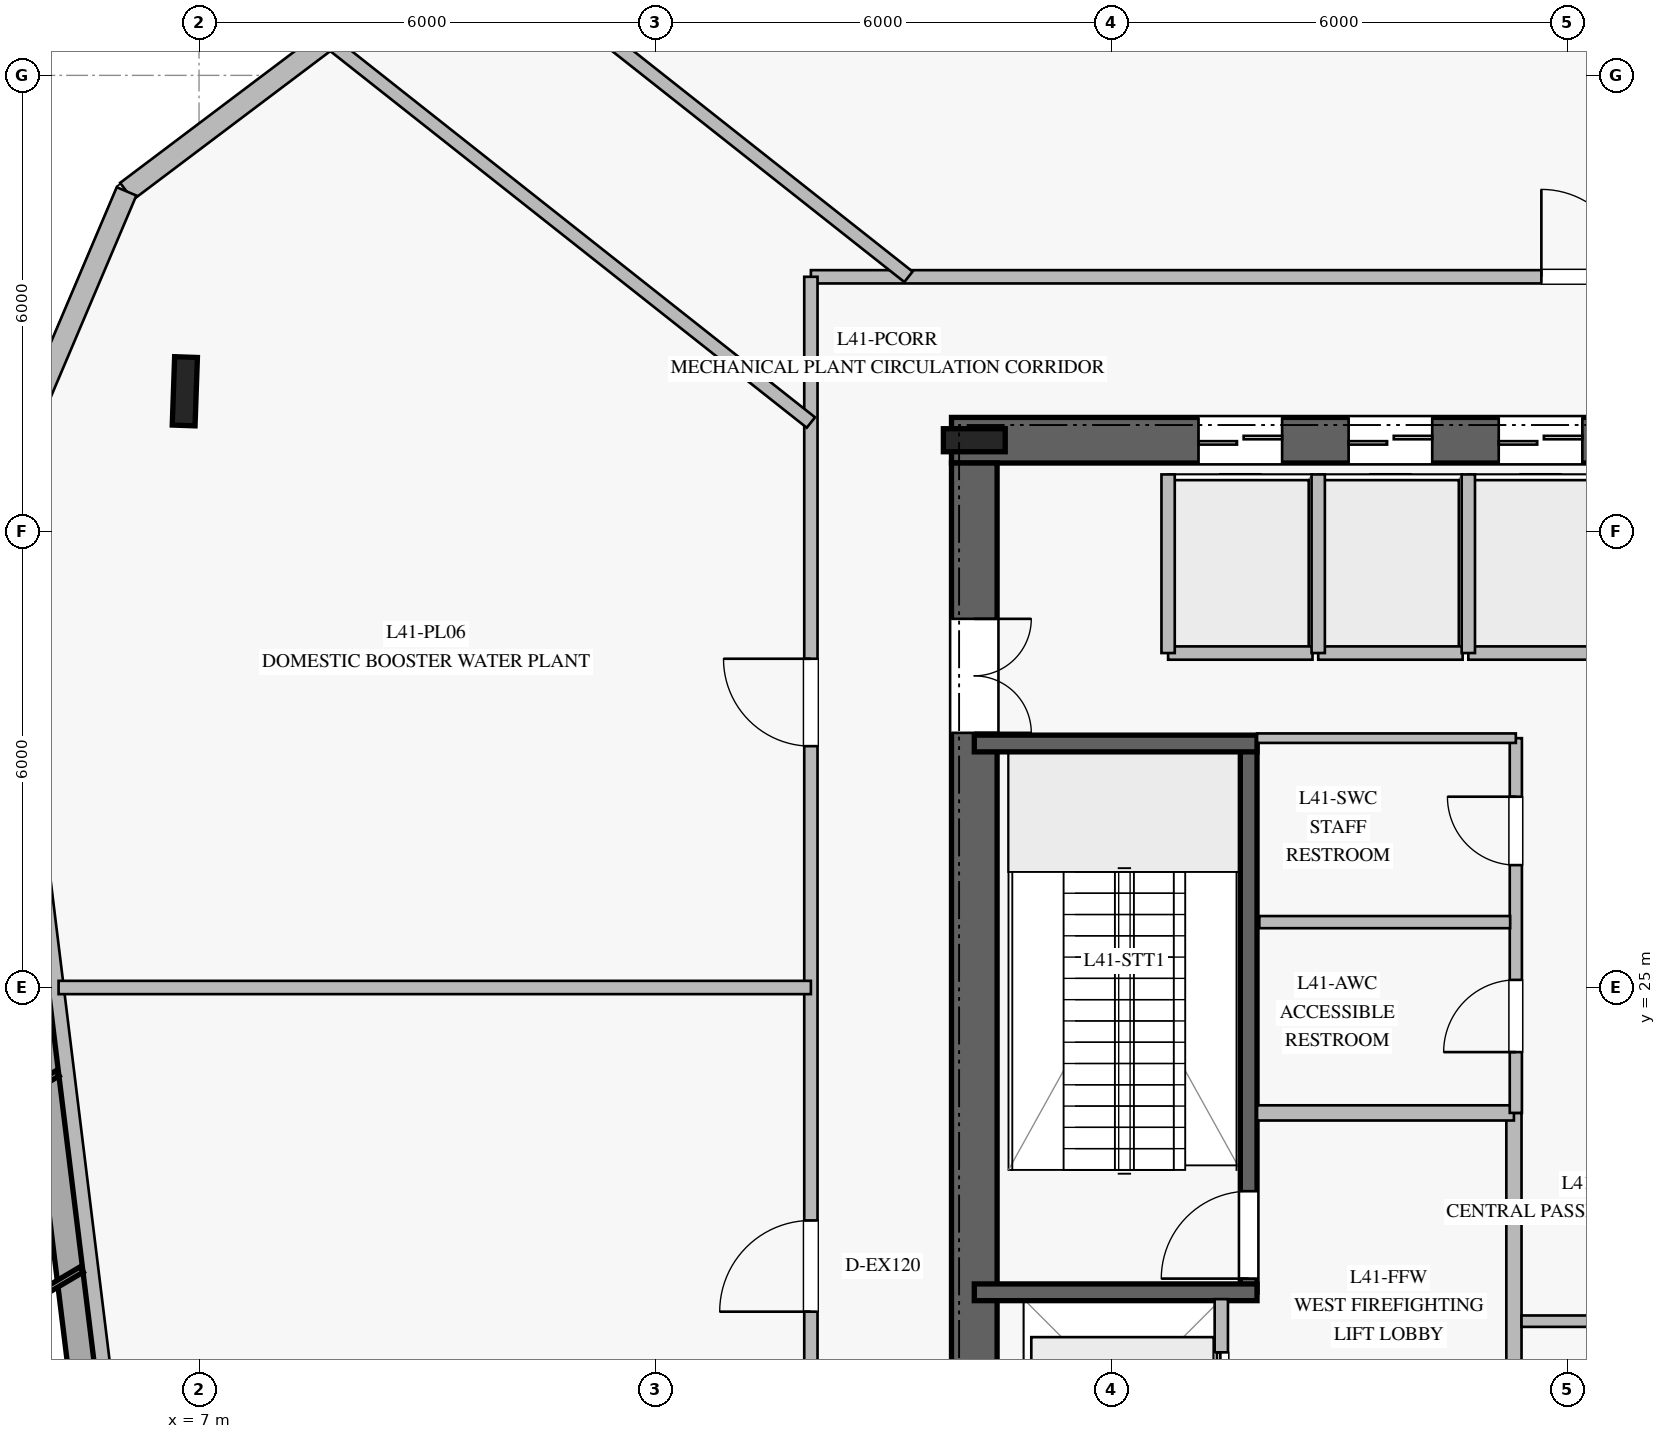
"""IFC4 building model, lengths in metres.
Left out: names, types, materials, properties, quantities, classifications, styles, units other than length and angle.
Written with IfcOpenShell. Run it as: python <this file> out.ifc"""

import sys

from ifc_helpers import new_model, si_unit, direction, frame, frame_2d, origin, origin_2d, place, context, subcontext, project, spatial, rectangle, i_section, extrude, element, fill, save


model = new_model("IFC4")
c1 = context("Model", 3, precision=1e-05, world=origin(), true_north=direction((0.0, 1.0)))
c2 = subcontext(c1, "Body", "Model", "MODEL_VIEW")
j1 = project(units=[si_unit("LENGTHUNIT", "METRE"), si_unit("PLANEANGLEUNIT", "RADIAN")], contexts=[c1])
p1 = place(None, origin())
s1 = spatial("IfcSite", under=j1, at=p1, CompositionType="ELEMENT")
p2 = place(p1, origin())
s2 = spatial("IfcBuilding", under=s1, at=p2, CompositionType="ELEMENT")
p3 = place(p2, frame((0.0, 0.0, 170.4)))
s3 = spatial("IfcBuildingStorey", under=s2, at=p3, CompositionType="ELEMENT", Elevation=170.4)
p4 = place(p3, frame((33.1, 32.2, 0.0), z_axis=(0.0, 0.0, 1.0), x_axis=(-1.0, 0.0, 0.0)))
e1 = element("IfcWall", 1, at=p4, inside=s3, PredefinedType="SHEAR", context=c2, shape_type="SweptSolid", body=[
    extrude(rectangle(XDim=16.2, YDim=0.6, at=frame_2d((8.1, 0.0))), origin(), (0.0, 0.0, 1.0), 5.14),
])
p5 = place(p4, frame((5.05, 0.0, 0.0)))
e2 = element("IfcOpeningElement", 2, at=p5, cuts=e1, PredefinedType="OPENING", context=c2, shape_type="SweptSolid", body=[
    extrude(rectangle(XDim=1.2, YDim=2.25, at=frame_2d((0.6, 1.125))), frame((0.0, 0.31, 0.0), z_axis=(0.0, -1.0, 0.0), x_axis=(1.0, 0.0, 0.0)), (0.0, 0.0, 1.0), 0.62),
])
p6 = place(p4, frame((11.85, 0.0, 0.0)))
e3 = element("IfcOpeningElement", 3, at=p6, cuts=e1, PredefinedType="OPENING", context=c2, shape_type="SweptSolid", body=[
    extrude(rectangle(XDim=1.1, YDim=2.2, at=frame_2d((0.55, 1.1))), frame((0.0, 0.31, 0.0), z_axis=(0.0, -1.0, 0.0), x_axis=(1.0, 0.0, 0.0)), (0.0, 0.0, 1.0), 0.62),
])
p7 = place(p4, frame((9.875, 0.0, 0.0)))
e4 = element("IfcOpeningElement", 4, at=p7, cuts=e1, PredefinedType="OPENING", context=c2, shape_type="SweptSolid", body=[
    extrude(rectangle(XDim=1.1, YDim=2.2, at=frame_2d((0.55, 1.1))), frame((0.0, 0.31, 0.0), z_axis=(0.0, -1.0, 0.0), x_axis=(1.0, 0.0, 0.0)), (0.0, 0.0, 1.0), 0.62),
])
p8 = place(p4, frame((7.9, 0.0, 0.0)))
e5 = element("IfcOpeningElement", 5, at=p8, cuts=e1, PredefinedType="OPENING", context=c2, shape_type="SweptSolid", body=[
    extrude(rectangle(XDim=1.1, YDim=2.2, at=frame_2d((0.55, 1.1))), frame((0.0, 0.31, 0.0), z_axis=(0.0, -1.0, 0.0), x_axis=(1.0, 0.0, 0.0)), (0.0, 0.0, 1.0), 0.62),
])
p9 = place(p3, frame((17.2, 31.9, 0.0), z_axis=(0.0, 0.0, 1.0), x_axis=(0.0, -1.0, 0.0)))
e6 = element("IfcWall", 6, at=p9, inside=s3, PredefinedType="SHEAR", context=c2, shape_type="SweptSolid", body=[
    extrude(rectangle(XDim=13.8, YDim=0.6, at=frame_2d((6.9, 0.0))), origin(), (0.0, 0.0, 1.0), 5.14),
])
p10 = place(p9, frame((2.05, 0.0, 0.0)))
e7 = element("IfcOpeningElement", 7, at=p10, cuts=e6, PredefinedType="OPENING", context=c2, shape_type="SweptSolid", body=[
    extrude(rectangle(XDim=1.5, YDim=2.2, at=frame_2d((0.75, 1.1))), frame((0.0, 0.31, 0.0), z_axis=(0.0, -1.0, 0.0), x_axis=(1.0, 0.0, 0.0)), (0.0, 0.0, 1.0), 0.62),
])
p11 = place(p3, frame((17.2, 32.2, 0.0), z_axis=(0.0, 0.0, 1.0), x_axis=(1.0, 0.0, 0.0)))
e8 = element("IfcColumn", 8, at=p11, inside=s3, PredefinedType="COLUMN", context=c2, shape_type="SweptSolid", body=[
    extrude(i_section(OverallWidth=0.303, OverallDepth=0.814, WebThickness=0.021, FlangeThickness=0.04, at=origin_2d()), origin(), (0.0, 0.0, 1.0), 5.4),
])
p12 = place(p3, frame((20.81, 20.99, 0.0), z_axis=(0.0, 0.0, 1.0), x_axis=(0.0, 1.0, 0.0)))
e9 = element("IfcWall", 9, at=p12, inside=s3, PredefinedType="SOLIDWALL", context=c2, shape_type="SweptSolid", body=[
    extrude(rectangle(XDim=7.22, YDim=0.22, at=frame_2d((3.61, 0.0))), origin(), (0.0, 0.0, 1.0), 5.14),
])
p13 = place(p12, frame((0.18, 0.0, 0.0)))
e10 = element("IfcOpeningElement", 10, at=p13, cuts=e9, PredefinedType="OPENING", context=c2, shape_type="SweptSolid", body=[
    extrude(rectangle(XDim=1.15, YDim=2.2, at=frame_2d((0.575, 1.1))), frame((0.0, 0.12, 0.0), z_axis=(0.0, -1.0, 0.0), x_axis=(1.0, 0.0, 0.0)), (0.0, 0.0, 1.0), 0.24),
])
for number, where, z_axis, x_axis in (
    (11, (17.2, 20.99, 0.0), (0.0, 0.0, 1.0), (1.0, 0.0, 0.0)),
    (12, (17.2, 28.21, 0.0), (0.0, 0.0, 1.0), (1.0, 0.0, 0.0)),
):
    element("IfcWall", number, at=place(p3, frame(where, z_axis=z_axis, x_axis=x_axis)), inside=s3, PredefinedType="SOLIDWALL", context=c2, shape_type="SweptSolid", body=[
        extrude(rectangle(XDim=3.72, YDim=0.22, at=frame_2d((1.86, 0.0))), origin(), (0.0, 0.0, 1.0), 5.14),
    ])
p14 = place(p3, frame((6.813, 32.844, 0.0), z_axis=(0.0, 0.0, 1.0), x_axis=(0.034899496703, 0.999390827019, 0.0)))
e13 = element("IfcColumn", 13, at=p14, inside=s3, PredefinedType="COLUMN", context=c2, shape_type="SweptSolid", body=[
    extrude(i_section(OverallWidth=0.3, OverallDepth=0.9, WebThickness=0.019, FlangeThickness=0.035, at=origin_2d()), origin(), (0.0, 0.0, 1.0), 5.4),
])
p15 = place(p3, frame((20.156, 46.108, 0.0), z_axis=(0.0, 0.0, 1.0), x_axis=(-0.798606661406, -0.601853304684, 0.0)))
e14 = element("IfcWall", 14, at=p15, inside=s3, PredefinedType="STANDARD", context=c2, shape_type="SweptSolid", body=[
    extrude(rectangle(XDim=17.668, YDim=0.28, at=frame_2d((8.834, 0.0))), origin(), (0.0, 0.0, 1.0), 5.14),
])
p16 = place(p3, frame((6.046, 35.474, 0.0), z_axis=(0.0, 0.0, 1.0), x_axis=(-0.390733557702, -0.920503822309, 0.0)))
e15 = element("IfcWall", 15, at=p16, inside=s3, PredefinedType="STANDARD", context=c2, shape_type="SweptSolid", body=[
    extrude(rectangle(XDim=4.471, YDim=0.28, at=frame_2d((2.235, 0.0))), origin(), (0.0, 0.0, 1.0), 5.14),
])
p17 = place(p3, frame((4.299, 31.359, 0.0), z_axis=(0.0, 0.0, 1.0), x_axis=(0.121845687451, -0.992549055941, 0.0)))
e16 = element("IfcWall", 16, at=p17, inside=s3, PredefinedType="STANDARD", context=c2, shape_type="SweptSolid", body=[
    extrude(rectangle(XDim=17.668, YDim=0.28, at=frame_2d((8.834, 0.0))), origin(), (0.0, 0.0, 1.0), 5.14),
])
p18 = place(p3, frame((24.3, 18.2, 0.0), z_axis=(0.0, 0.0, 1.0), x_axis=(0.0, 1.0, 0.0)))
e17 = element("IfcWall", 17, at=p18, inside=s3, PredefinedType="PARTITIONING", context=c2, shape_type="SweptSolid", body=[
    extrude(rectangle(XDim=5.15, YDim=0.2, at=frame_2d((2.575, 0.0))), origin(), (0.0, 0.0, 1.0), 5.14),
])
p19 = place(p3, frame((20.92, 23.35, 0.0), z_axis=(0.0, 0.0, 1.0), x_axis=(1.0, 0.0, 0.0)))
e18 = element("IfcWall", 18, at=p19, inside=s3, PredefinedType="PARTITIONING", context=c2, shape_type="SweptSolid", body=[
    extrude(rectangle(XDim=3.38, YDim=0.2, at=frame_2d((1.69, 0.0))), origin(), (0.0, 0.0, 1.0), 5.14),
])
p20 = place(p3, frame((24.325, 23.35, 0.0), z_axis=(0.0, 0.0, 1.0), x_axis=(0.0, 1.0, 0.0)))
e19 = element("IfcWall", 19, at=p20, inside=s3, PredefinedType="PLUMBINGWALL", context=c2, shape_type="SweptSolid", body=[
    extrude(rectangle(XDim=4.93, YDim=0.16, at=frame_2d((2.465, 0.0))), origin(), (0.0, 0.0, 1.0), 5.14),
])
p21 = place(p20, frame((0.8, 0.0, 0.0)))
e20 = element("IfcOpeningElement", 20, at=p21, cuts=e19, PredefinedType="OPENING", context=c2, shape_type="SweptSolid", body=[
    extrude(rectangle(XDim=0.95, YDim=2.1, at=frame_2d((0.475, 1.05))), frame((0.0, 0.09, 0.0), z_axis=(0.0, -1.0, 0.0), x_axis=(1.0, 0.0, 0.0)), (0.0, 0.0, 1.0), 0.18),
])
p22 = place(p20, frame((3.26, 0.0, 0.0)))
e21 = element("IfcOpeningElement", 21, at=p22, cuts=e19, PredefinedType="OPENING", context=c2, shape_type="SweptSolid", body=[
    extrude(rectangle(XDim=0.9, YDim=2.1, at=frame_2d((0.45, 1.05))), frame((0.0, 0.09, 0.0), z_axis=(0.0, -1.0, 0.0), x_axis=(1.0, 0.0, 0.0)), (0.0, 0.0, 1.0), 0.18),
])
p23 = place(p3, frame((20.92, 28.28, 0.0), z_axis=(0.0, 0.0, 1.0), x_axis=(1.0, 0.0, 0.0)))
e22 = element("IfcWall", 22, at=p23, inside=s3, PredefinedType="PARTITIONING", context=c2, shape_type="SweptSolid", body=[
    extrude(rectangle(XDim=3.405, YDim=0.125, at=frame_2d((1.703, 0.0))), origin(), (0.0, 0.0, 1.0), 5.14),
])
p24 = place(p3, frame((20.95, 25.86, 0.0), z_axis=(0.0, 0.0, 1.0), x_axis=(1.0, 0.0, 0.0)))
e23 = element("IfcWall", 23, at=p24, inside=s3, PredefinedType="PLUMBINGWALL", context=c2, shape_type="SweptSolid", body=[
    extrude(rectangle(XDim=3.3, YDim=0.16, at=frame_2d((1.65, 0.0))), origin(), (0.0, 0.0, 1.0), 5.14),
])
p25 = place(p3, frame((24.4, 20.61, 0.0), z_axis=(0.0, 0.0, 1.0), x_axis=(1.0, 0.0, 0.0)))
e24 = element("IfcWall", 24, at=p25, inside=s3, PredefinedType="PARTITIONING", context=c2, shape_type="SweptSolid", body=[
    extrude(rectangle(XDim=5.9, YDim=0.15, at=frame_2d((2.95, 0.0))), origin(), (0.0, 0.0, 1.0), 5.14),
])
p26 = place(p3, frame((19.75, 29.4, 0.0), z_axis=(0.0, 0.0, 1.0), x_axis=(1.0, 0.0, 0.0)))
e25 = element("IfcWall", 25, at=p26, inside=s3, PredefinedType="PARTITIONING", context=c2, shape_type="SweptSolid", body=[
    extrude(rectangle(XDim=1.9, YDim=0.175, at=frame_2d((0.95, 0.0))), origin(), (0.0, 0.0, 1.0), 5.14),
])
p27 = place(p3, frame((19.75, 29.4, 0.0), z_axis=(0.0, 0.0, 1.0), x_axis=(0.0, 1.0, 0.0)))
e26 = element("IfcWall", 26, at=p27, inside=s3, PredefinedType="PARTITIONING", context=c2, shape_type="SweptSolid", body=[
    extrude(rectangle(XDim=2.35, YDim=0.175, at=frame_2d((1.175, 0.0))), origin(), (0.0, 0.0, 1.0), 5.14),
])
p28 = place(p3, frame((21.725, 29.4, 0.0), z_axis=(0.0, 0.0, 1.0), x_axis=(1.0, 0.0, 0.0)))
e27 = element("IfcWall", 27, at=p28, inside=s3, PredefinedType="PARTITIONING", context=c2, shape_type="SweptSolid", body=[
    extrude(rectangle(XDim=1.9, YDim=0.175, at=frame_2d((0.95, 0.0))), origin(), (0.0, 0.0, 1.0), 5.14),
])
p29 = place(p3, frame((21.725, 29.4, 0.0), z_axis=(0.0, 0.0, 1.0), x_axis=(0.0, 1.0, 0.0)))
e28 = element("IfcWall", 28, at=p29, inside=s3, PredefinedType="PARTITIONING", context=c2, shape_type="SweptSolid", body=[
    extrude(rectangle(XDim=2.35, YDim=0.175, at=frame_2d((1.175, 0.0))), origin(), (0.0, 0.0, 1.0), 5.14),
])
p30 = place(p3, frame((23.7, 29.4, 0.0), z_axis=(0.0, 0.0, 1.0), x_axis=(1.0, 0.0, 0.0)))
e29 = element("IfcWall", 29, at=p30, inside=s3, PredefinedType="PARTITIONING", context=c2, shape_type="SweptSolid", body=[
    extrude(rectangle(XDim=1.9, YDim=0.175, at=frame_2d((0.95, 0.0))), origin(), (0.0, 0.0, 1.0), 5.14),
])
p31 = place(p3, frame((23.7, 29.4, 0.0), z_axis=(0.0, 0.0, 1.0), x_axis=(0.0, 1.0, 0.0)))
e30 = element("IfcWall", 30, at=p31, inside=s3, PredefinedType="PARTITIONING", context=c2, shape_type="SweptSolid", body=[
    extrude(rectangle(XDim=2.35, YDim=0.175, at=frame_2d((1.175, 0.0))), origin(), (0.0, 0.0, 1.0), 5.14),
])
p32 = place(p3, frame((20.45, 18.3, 0.0), z_axis=(0.0, 0.0, 1.0), x_axis=(0.0, 1.0, 0.0)))
e31 = element("IfcWall", 31, at=p32, inside=s3, PredefinedType="PARTITIONING", context=c2, shape_type="SweptSolid", body=[
    extrude(rectangle(XDim=2.6, YDim=0.175, at=frame_2d((1.3, 0.0))), origin(), (0.0, 0.0, 1.0), 5.14),
])
p33 = place(p32, frame((0.7, 0.0, 0.0)))
e32 = element("IfcOpeningElement", 32, at=p33, cuts=e31, PredefinedType="OPENING", context=c2, shape_type="SweptSolid", body=[
    extrude(rectangle(XDim=1.2, YDim=2.2, at=frame_2d((0.6, 1.1))), frame((0.0, 0.098, 0.0), z_axis=(0.0, -1.0, 0.0), x_axis=(1.0, 0.0, 0.0)), (0.0, 0.0, 1.0), 0.195),
])
p34 = place(p3, frame((15.05, 34.35, 0.0), z_axis=(0.0, 0.0, 1.0), x_axis=(1.0, 0.0, 0.0)))
e33 = element("IfcWall", 33, at=p34, inside=s3, PredefinedType="PARTITIONING", context=c2, shape_type="SweptSolid", body=[
    extrude(rectangle(XDim=19.9, YDim=0.175, at=frame_2d((9.95, 0.0))), origin(), (0.0, 0.0, 1.0), 3.54),
])
p35 = place(p34, frame((9.611, 0.0, 0.0)))
e34 = element("IfcOpeningElement", 34, at=p35, cuts=e33, PredefinedType="OPENING", context=c2, shape_type="SweptSolid", body=[
    extrude(rectangle(XDim=1.15, YDim=2.2, at=frame_2d((0.575, 1.1))), frame((0.0, 0.098, 0.0), z_axis=(0.0, -1.0, 0.0), x_axis=(1.0, 0.0, 0.0)), (0.0, 0.0, 1.0), 0.195),
])
p36 = place(p3, frame((15.05, 15.65, 0.0), z_axis=(0.0, 0.0, 1.0), x_axis=(0.0, 1.0, 0.0)))
e35 = element("IfcWall", 35, at=p36, inside=s3, PredefinedType="PARTITIONING", context=c2, shape_type="SweptSolid", body=[
    extrude(rectangle(XDim=18.7, YDim=0.175, at=frame_2d((9.35, 0.0))), origin(), (0.0, 0.0, 1.0), 3.54),
])
p37 = place(p36, frame((5.085, 0.0, 0.0)))
e36 = element("IfcOpeningElement", 36, at=p37, cuts=e35, PredefinedType="OPENING", context=c2, shape_type="SweptSolid", body=[
    extrude(rectangle(XDim=1.2, YDim=2.25, at=frame_2d((0.6, 1.125))), frame((0.0, 0.098, 0.0), z_axis=(0.0, -1.0, 0.0), x_axis=(1.0, 0.0, 0.0)), (0.0, 0.0, 1.0), 0.195),
])
p38 = place(p36, frame((12.525, 0.0, 0.0)))
e37 = element("IfcOpeningElement", 37, at=p38, cuts=e35, PredefinedType="OPENING", context=c2, shape_type="SweptSolid", body=[
    extrude(rectangle(XDim=1.15, YDim=2.2, at=frame_2d((0.575, 1.1))), frame((0.0, 0.098, 0.0), z_axis=(0.0, -1.0, 0.0), x_axis=(1.0, 0.0, 0.0)), (0.0, 0.0, 1.0), 0.195),
])
p39 = place(p3, frame((16.334, 34.35, 0.0), z_axis=(0.0, 0.0, 1.0), x_axis=(-0.784600993116, 0.620001033549, 0.0)))
e38 = element("IfcWall", 38, at=p39, inside=s3, PredefinedType="PARTITIONING", context=c2, shape_type="SweptSolid", body=[
    extrude(rectangle(XDim=7.254, YDim=0.175, at=frame_2d((3.627, 0.0))), origin(), (0.0, 0.0, 1.0), 3.53),
])
p40 = place(p3, frame((15.05, 32.433, 0.0), z_axis=(0.0, 0.0, 1.0), x_axis=(-0.784559222655, 0.620053889712, 0.0)))
e39 = element("IfcWall", 39, at=p40, inside=s3, PredefinedType="PARTITIONING", context=c2, shape_type="SweptSolid", body=[
    extrude(rectangle(XDim=8.038, YDim=0.175, at=frame_2d((4.019, 0.0))), origin(), (0.0, 0.0, 1.0), 3.53),
])
p41 = place(p3, frame((15.05, 25.0, 0.0), z_axis=(0.0, 0.0, 1.0), x_axis=(-1.0, 0.0, 0.0)))
e40 = element("IfcWall", 40, at=p41, inside=s3, PredefinedType="PARTITIONING", context=c2, shape_type="SweptSolid", body=[
    extrude(rectangle(XDim=9.898, YDim=0.175, at=frame_2d((4.949, 0.0))), origin(), (0.0, 0.0, 1.0), 3.53),
])
p42 = place(p13, origin())
e41 = element("IfcDoor", 41, at=p42, inside=s3, OperationType="SINGLE_SWING_LEFT", PredefinedType="DOOR", context=c2, shape_type="SweptSolid", body=[
    extrude(rectangle(XDim=1.15, YDim=2.2, at=frame_2d((0.575, 1.1))), frame((0.0, 0.025, 0.0), z_axis=(0.0, -1.0, 0.0), x_axis=(1.0, 0.0, 0.0)), (0.0, 0.0, 1.0), 0.05),
])
fill(e10, e41)
p43 = place(p10, origin())
e42 = element("IfcDoor", 42, at=p43, inside=s3, OperationType="DOUBLE_DOOR_SINGLE_SWING", PredefinedType="DOOR", context=c2, shape_type="SweptSolid", body=[
    extrude(rectangle(XDim=1.5, YDim=2.2, at=frame_2d((0.75, 1.1))), frame((0.0, 0.025, 0.0), z_axis=(0.0, -1.0, 0.0), x_axis=(1.0, 0.0, 0.0)), (0.0, 0.0, 1.0), 0.05),
])
fill(e7, e42)
p44 = place(p21, origin())
e43 = element("IfcDoor", 43, at=p44, inside=s3, OperationType="SINGLE_SWING_LEFT", PredefinedType="DOOR", context=c2, shape_type="SweptSolid", body=[
    extrude(rectangle(XDim=0.95, YDim=2.1, at=frame_2d((0.475, 1.05))), frame((0.0, 0.025, 0.0), z_axis=(0.0, -1.0, 0.0), x_axis=(1.0, 0.0, 0.0)), (0.0, 0.0, 1.0), 0.05),
])
fill(e20, e43)
p45 = place(p22, origin())
e44 = element("IfcDoor", 44, at=p45, inside=s3, OperationType="SINGLE_SWING_RIGHT", PredefinedType="DOOR", context=c2, shape_type="SweptSolid", body=[
    extrude(rectangle(XDim=0.9, YDim=2.1, at=frame_2d((0.45, 1.05))), frame((0.0, 0.025, 0.0), z_axis=(0.0, -1.0, 0.0), x_axis=(1.0, 0.0, 0.0)), (0.0, 0.0, 1.0), 0.05),
])
fill(e21, e44)
p46 = place(p6, origin())
e45 = element("IfcDoor", 45, at=p46, inside=s3, OperationType="DOUBLE_DOOR_SLIDING", PredefinedType="DOOR", context=c2, shape_type="SweptSolid", body=[
    extrude(rectangle(XDim=1.1, YDim=2.2, at=frame_2d((0.55, 1.1))), frame((0.0, 0.025, 0.0), z_axis=(0.0, -1.0, 0.0), x_axis=(1.0, 0.0, 0.0)), (0.0, 0.0, 1.0), 0.05),
])
fill(e3, e45)
p47 = place(p7, origin())
e46 = element("IfcDoor", 46, at=p47, inside=s3, OperationType="DOUBLE_DOOR_SLIDING", PredefinedType="DOOR", context=c2, shape_type="SweptSolid", body=[
    extrude(rectangle(XDim=1.1, YDim=2.2, at=frame_2d((0.55, 1.1))), frame((0.0, 0.025, 0.0), z_axis=(0.0, -1.0, 0.0), x_axis=(1.0, 0.0, 0.0)), (0.0, 0.0, 1.0), 0.05),
])
fill(e4, e46)
p48 = place(p8, origin())
e47 = element("IfcDoor", 47, at=p48, inside=s3, OperationType="DOUBLE_DOOR_SLIDING", PredefinedType="DOOR", context=c2, shape_type="SweptSolid", body=[
    extrude(rectangle(XDim=1.1, YDim=2.2, at=frame_2d((0.55, 1.1))), frame((0.0, 0.025, 0.0), z_axis=(0.0, -1.0, 0.0), x_axis=(1.0, 0.0, 0.0)), (0.0, 0.0, 1.0), 0.05),
])
fill(e5, e47)
p49 = place(p33, origin())
e48 = element("IfcDoor", 48, at=p49, inside=s3, OperationType="DOUBLE_DOOR_SLIDING", PredefinedType="DOOR", context=c2, shape_type="SweptSolid", body=[
    extrude(rectangle(XDim=1.2, YDim=2.2, at=frame_2d((0.6, 1.1))), frame((0.0, 0.025, 0.0), z_axis=(0.0, -1.0, 0.0), x_axis=(1.0, 0.0, 0.0)), (0.0, 0.0, 1.0), 0.05),
])
fill(e32, e48)
p50 = place(p37, origin())
e49 = element("IfcDoor", 49, at=p50, inside=s3, OperationType="SINGLE_SWING_LEFT", PredefinedType="DOOR", context=c2, shape_type="SweptSolid", body=[
    extrude(rectangle(XDim=1.2, YDim=2.25, at=frame_2d((0.6, 1.125))), frame((0.0, 0.025, 0.0), z_axis=(0.0, -1.0, 0.0), x_axis=(1.0, 0.0, 0.0)), (0.0, 0.0, 1.0), 0.05),
])
fill(e36, e49)
p51 = place(p35, origin())
e50 = element("IfcDoor", 50, at=p51, inside=s3, OperationType="SINGLE_SWING_LEFT", PredefinedType="DOOR", context=c2, shape_type="SweptSolid", body=[
    extrude(rectangle(XDim=1.15, YDim=2.2, at=frame_2d((0.575, 1.1))), frame((0.0, 0.025, 0.0), z_axis=(0.0, -1.0, 0.0), x_axis=(1.0, 0.0, 0.0)), (0.0, 0.0, 1.0), 0.05),
])
fill(e34, e50)
p52 = place(p38, origin())
e51 = element("IfcDoor", 51, at=p52, inside=s3, OperationType="SINGLE_SWING_RIGHT", PredefinedType="DOOR", context=c2, shape_type="SweptSolid", body=[
    extrude(rectangle(XDim=1.15, YDim=2.2, at=frame_2d((0.575, 1.1))), frame((0.0, 0.025, 0.0), z_axis=(0.0, -1.0, 0.0), x_axis=(1.0, 0.0, 0.0)), (0.0, 0.0, 1.0), 0.05),
])
fill(e37, e51)
save(model, sys.argv[1])
